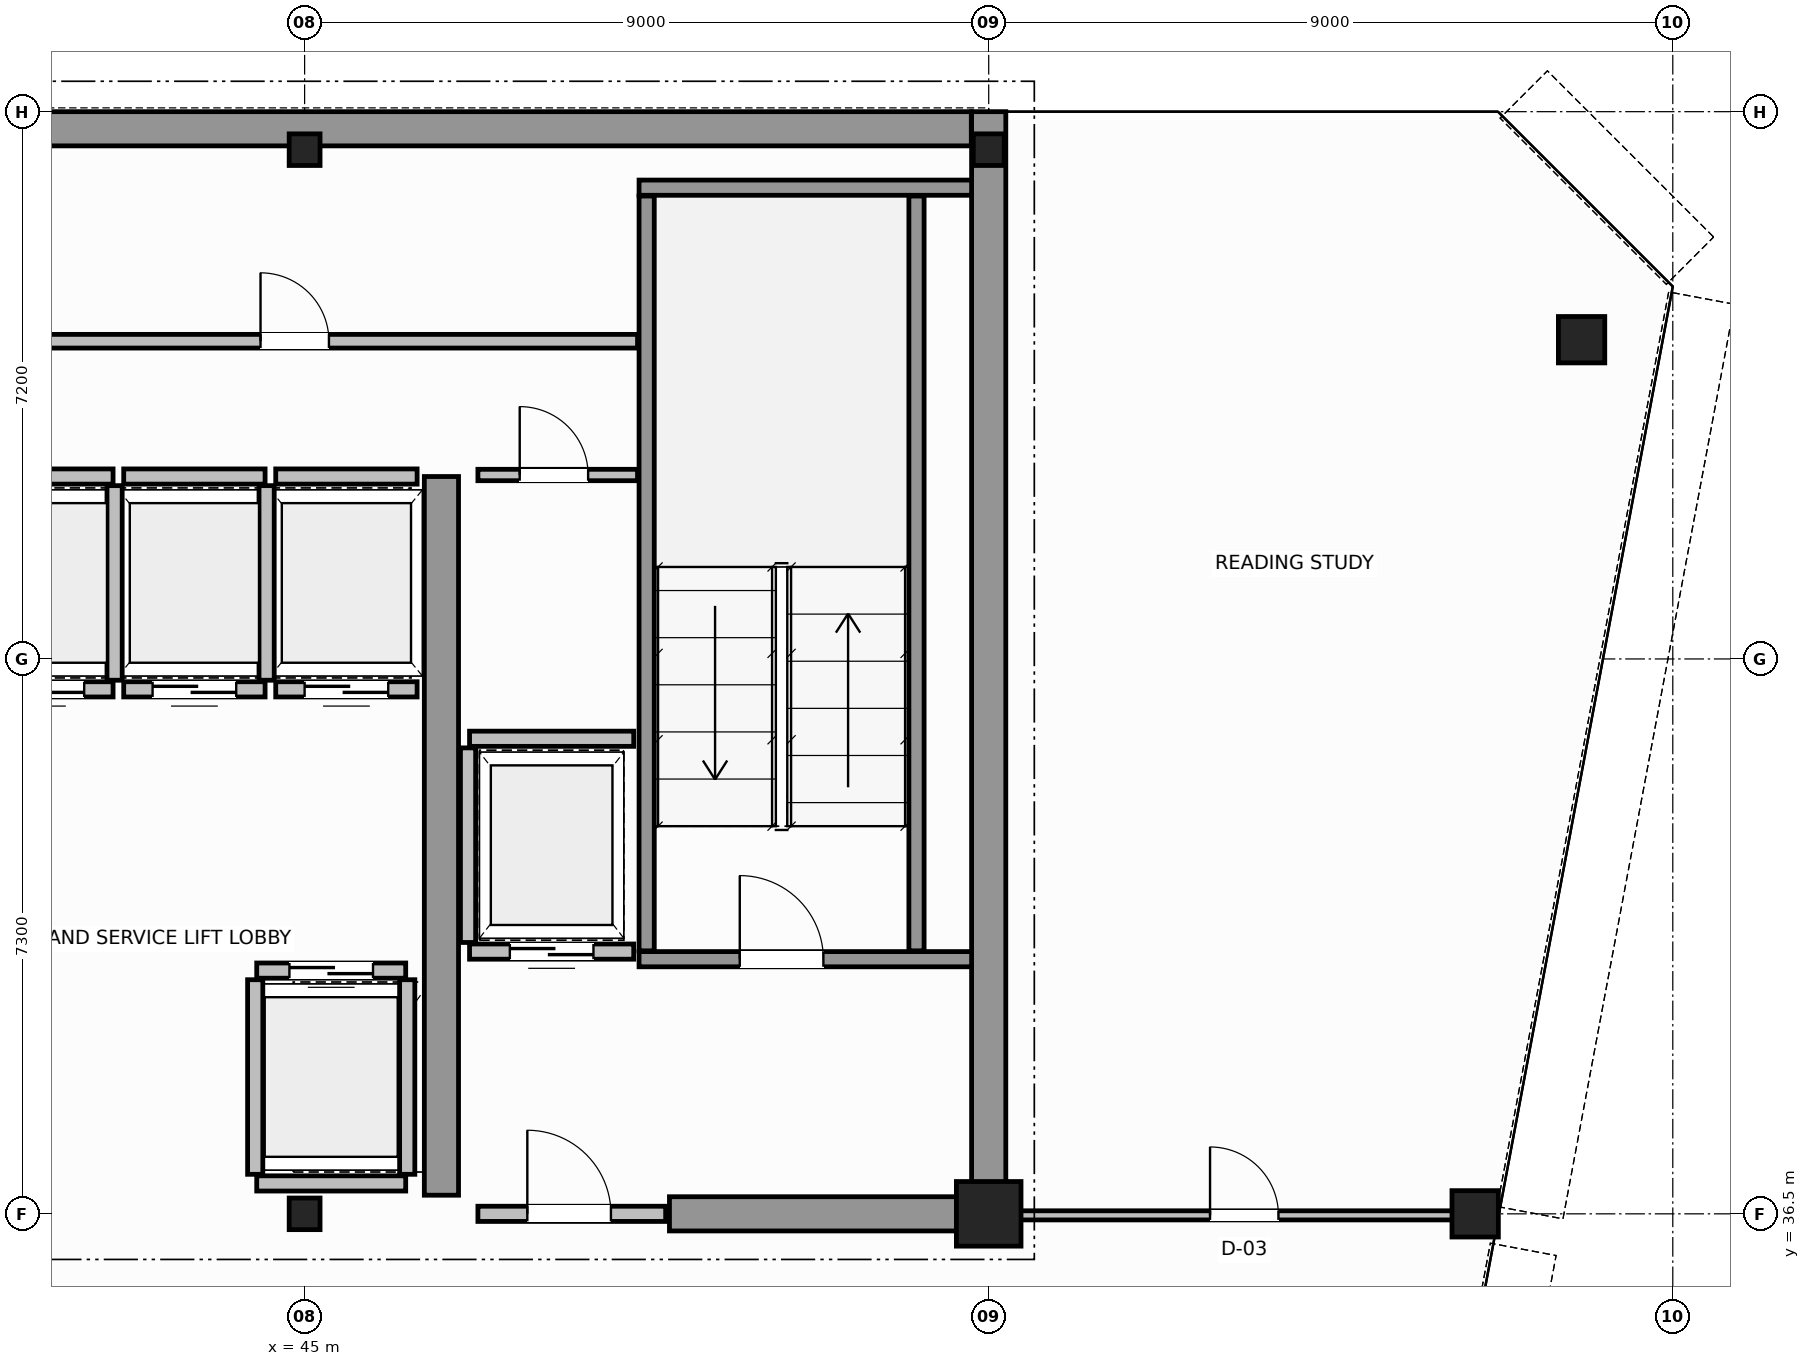
"""IFC4 building model, lengths in metres.
Left out: names, types, materials, properties, quantities, classifications, styles, units other than length and angle.
Written with IfcOpenShell. Run it as: python <this file> out.ifc"""

import sys

from ifc_helpers import new_model, si_unit, direction, frame, frame_2d, origin, origin_2d, place, context, subcontext, project, spatial, rectangle, hollow_circle, i_section, extrude, source, transform, mapped, element, fill, save


model = new_model("IFC4")
c1 = context("Model", 3, precision=1e-05, world=origin(), true_north=direction((0.0, 1.0)))
c2 = subcontext(c1, "Body", "Model", "MODEL_VIEW")
j1 = project(units=[si_unit("LENGTHUNIT", "METRE"), si_unit("PLANEANGLEUNIT", "RADIAN")], contexts=[c1])
p1 = place(None, origin())
s1 = spatial("IfcSite", under=j1, at=p1, CompositionType="ELEMENT")
p2 = place(p1, origin())
s2 = spatial("IfcBuilding", under=s1, at=p2, CompositionType="ELEMENT")
p3 = place(p2, frame((0.0, 0.0, 272.6)))
s3 = spatial("IfcBuildingStorey", under=s2, at=p3, CompositionType="ELEMENT", Elevation=272.6)
m1 = source(origin(), c2, "Body", "SweptSolid", [
    extrude(i_section(OverallWidth=0.406, OverallDepth=0.416, WebThickness=0.03, FlangeThickness=0.042, FilletRadius=0.015, at=origin_2d()), origin(), (0.0, 0.0, 1.0), 3.8),
])
p4 = place(p3, frame((45.0, 36.5, 0.0), z_axis=(0.0, 0.0, 1.0), x_axis=(1.0, 0.0, 0.0)))
e1 = element("IfcColumn", 1, at=p4, inside=s3, PredefinedType="COLUMN", context=c2, shape_type="MappedRepresentation", body=[
    mapped(m1, transform((0.0, 0.0, 0.0), scale=1.0)),
])
m2 = source(origin(), c2, "Body", "SweptSolid", [
    extrude(rectangle(XDim=0.85, YDim=0.85, at=origin_2d()), origin(), (0.0, 0.0, 1.0), 3.8),
])
p5 = place(p3, frame((54.0, 36.5, 0.0), z_axis=(0.0, 0.0, 1.0), x_axis=(1.0, 0.0, 0.0)))
e2 = element("IfcColumn", 2, at=p5, inside=s3, PredefinedType="COLUMN", context=c2, shape_type="MappedRepresentation", body=[
    mapped(m2, transform((0.0, 0.0, 0.0), scale=1.0)),
])
for number, where, z_axis, x_axis in (
    (3, (45.0, 50.5, 0.0), (0.0, 0.0, 1.0), (1.0, 0.0, 0.0)),
    (4, (54.0, 50.5, 0.0), (0.0, 0.0, 1.0), (1.0, 0.0, 0.0)),
):
    element("IfcColumn", number, at=place(p3, frame(where, z_axis=z_axis, x_axis=x_axis)), inside=s3, PredefinedType="COLUMN", context=c2, shape_type="MappedRepresentation", body=[
        mapped(m1, transform((0.0, 0.0, 0.0), scale=1.0)),
    ])
m3 = source(origin(), c2, "Body", "SweptSolid", [
    extrude(hollow_circle(Radius=0.305, WallThickness=0.03, at=origin_2d()), origin(), (0.0, 0.0, 1.0), 3.8),
])
for number, where, z_axis, x_axis in (
    (5, (61.8, 48.0, 0.0), (0.0, 0.0, 1.0), (1.0, 0.0, 0.0)),
    (6, (60.4, 36.5, 0.0), (0.0, 0.0, 1.0), (1.0, 0.0, 0.0)),
):
    element("IfcColumn", number, at=place(p3, frame(where, z_axis=z_axis, x_axis=x_axis)), inside=s3, PredefinedType="COLUMN", context=c2, shape_type="MappedRepresentation", body=[
        mapped(m3, transform((0.0, 0.0, 0.0), scale=1.0)),
    ])
p6 = place(p3, frame((34.002, 50.775, 0.0), z_axis=(0.0, 0.0, 1.0), x_axis=(1.0, 0.0, 0.0)))
e7 = element("IfcWall", 7, at=p6, inside=s3, PredefinedType="SHEAR", context=c2, shape_type="SweptSolid", body=[
    extrude(rectangle(XDim=19.769, YDim=0.45, at=frame_2d((9.885, 0.0))), origin(), (0.0, 0.0, 1.0), 3.8),
])
p7 = place(p3, frame((54.0, 36.5, 0.0), z_axis=(0.0, 0.0, 1.0), x_axis=(0.0, 1.0, 0.0)))
e8 = element("IfcWall", 8, at=p7, inside=s3, PredefinedType="SHEAR", context=c2, shape_type="SweptSolid", body=[
    extrude(rectangle(XDim=14.5, YDim=0.45, at=frame_2d((7.25, 0.0))), origin(), (0.0, 0.0, 1.0), 3.8),
])
p8 = place(p3, frame((49.8, 36.5, 0.0), z_axis=(0.0, 0.0, 1.0), x_axis=(1.0, 0.0, 0.0)))
e9 = element("IfcWall", 9, at=p8, inside=s3, PredefinedType="SHEAR", context=c2, shape_type="SweptSolid", body=[
    extrude(rectangle(XDim=3.955, YDim=0.45, at=frame_2d((1.978, 0.0))), origin(), (0.0, 0.0, 1.0), 2.58),
])
p9 = place(p3, frame((46.8, 36.745, 0.0), z_axis=(0.0, 0.0, 1.0), x_axis=(0.0, 1.0, 0.0)))
e10 = element("IfcWall", 10, at=p9, inside=s3, PredefinedType="SHEAR", context=c2, shape_type="SweptSolid", body=[
    extrude(rectangle(XDim=9.455, YDim=0.45, at=frame_2d((4.728, 0.0))), origin(), (0.0, 0.0, 1.0), 3.8),
])
p10 = place(p3, frame((49.4, 39.85, 0.0), z_axis=(0.0, 0.0, 1.0), x_axis=(1.0, 0.0, 0.0)))
e11 = element("IfcWall", 11, at=p10, inside=s3, PredefinedType="SOLIDWALL", context=c2, shape_type="SweptSolid", body=[
    extrude(rectangle(XDim=4.375, YDim=0.2, at=frame_2d((2.188, 0.0))), origin(), (0.0, 0.0, 1.0), 3.8),
])
p11 = place(p10, frame((1.325, 0.0, 0.0)))
e12 = element("IfcOpeningElement", 12, at=p11, cuts=e11, PredefinedType="OPENING", context=c2, shape_type="SweptSolid", body=[
    extrude(rectangle(XDim=1.1, YDim=2.15, at=frame_2d((0.55, 1.075))), frame((0.0, 0.11, 0.0), z_axis=(0.0, -1.0, 0.0), x_axis=(1.0, 0.0, 0.0)), (0.0, 0.0, 1.0), 0.22),
])
p12 = place(p3, frame((49.4, 50.0, 0.0), z_axis=(0.0, 0.0, 1.0), x_axis=(1.0, 0.0, 0.0)))
e13 = element("IfcWall", 13, at=p12, inside=s3, PredefinedType="SOLIDWALL", context=c2, shape_type="SweptSolid", body=[
    extrude(rectangle(XDim=4.375, YDim=0.2, at=frame_2d((2.188, 0.0))), origin(), (0.0, 0.0, 1.0), 3.8),
])
for number, where, z_axis, x_axis in (
    (14, (49.5, 39.96, 0.0), (0.0, 0.0, 1.0), (0.0, 1.0, 0.0)),
    (15, (53.05, 39.96, 0.0), (0.0, 0.0, 1.0), (0.0, 1.0, 0.0)),
):
    element("IfcWall", number, at=place(p3, frame(where, z_axis=z_axis, x_axis=x_axis)), inside=s3, PredefinedType="SOLIDWALL", context=c2, shape_type="SweptSolid", body=[
        extrude(rectangle(XDim=9.93, YDim=0.2, at=frame_2d((4.965, 0.0))), origin(), (0.0, 0.0, 1.0), 3.8),
    ])
p13 = place(p3, frame((47.28, 36.5, 0.0), z_axis=(0.0, 0.0, 1.0), x_axis=(1.0, 0.0, 0.0)))
e16 = element("IfcWall", 16, at=p13, inside=s3, PredefinedType="SOLIDWALL", context=c2, shape_type="SweptSolid", body=[
    extrude(rectangle(XDim=2.47, YDim=0.2, at=frame_2d((1.235, 0.0))), origin(), (0.0, 0.0, 1.0), 2.57),
])
p14 = place(p13, frame((0.65, 0.0, 0.0)))
e17 = element("IfcOpeningElement", 17, at=p14, cuts=e16, PredefinedType="OPENING", context=c2, shape_type="SweptSolid", body=[
    extrude(rectangle(XDim=1.1, YDim=2.15, at=frame_2d((0.55, 1.075))), frame((0.0, 0.11, 0.0), z_axis=(0.0, -1.0, 0.0), x_axis=(1.0, 0.0, 0.0)), (0.0, 0.0, 1.0), 0.22),
])
p15 = place(p3, frame((44.37, 39.7, 0.0), z_axis=(0.0, 0.0, 1.0), x_axis=(1.0, 0.0, 0.0)))
e18 = element("IfcWall", 18, at=p15, inside=s3, PredefinedType="SOLIDWALL", context=c2, shape_type="SweptSolid", body=[
    extrude(rectangle(XDim=1.96, YDim=0.2, at=frame_2d((0.98, 0.0))), origin(), (0.0, 0.0, 1.0), 3.58),
])
p16 = place(p15, frame((0.43, 0.0, 0.0)))
e19 = element("IfcOpeningElement", 19, at=p16, cuts=e18, PredefinedType="OPENING", context=c2, shape_type="SweptSolid", body=[
    extrude(rectangle(XDim=1.1, YDim=2.15, at=frame_2d((0.55, 1.075))), frame((0.0, 0.11, 0.0), z_axis=(0.0, -1.0, 0.0), x_axis=(1.0, 0.0, 0.0)), (0.0, 0.0, 1.0), 0.22),
])
p17 = place(p3, frame((44.37, 36.9, 0.0), z_axis=(0.0, 0.0, 1.0), x_axis=(1.0, 0.0, 0.0)))
e20 = element("IfcWall", 20, at=p17, inside=s3, PredefinedType="SOLIDWALL", context=c2, shape_type="SweptSolid", body=[
    extrude(rectangle(XDim=1.96, YDim=0.2, at=frame_2d((0.98, 0.0))), origin(), (0.0, 0.0, 1.0), 2.57),
])
for number, where, z_axis, x_axis in (
    (21, (44.35, 37.02, 0.0), (0.0, 0.0, 1.0), (0.0, 1.0, 0.0)),
    (22, (46.35, 37.02, 0.0), (0.0, 0.0, 1.0), (0.0, 1.0, 0.0)),
):
    element("IfcWall", number, at=place(p3, frame(where, z_axis=z_axis, x_axis=x_axis)), inside=s3, PredefinedType="SOLIDWALL", context=c2, shape_type="SweptSolid", body=[
        extrude(rectangle(XDim=2.56, YDim=0.2, at=frame_2d((1.28, 0.0))), origin(), (0.0, 0.0, 1.0), 3.58),
    ])
p18 = place(p3, frame((40.62, 43.4, 0.0), z_axis=(0.0, 0.0, 1.0), x_axis=(1.0, 0.0, 0.0)))
e23 = element("IfcWall", 23, at=p18, inside=s3, PredefinedType="SOLIDWALL", context=c2, shape_type="SweptSolid", body=[
    extrude(rectangle(XDim=1.86, YDim=0.2, at=frame_2d((0.93, 0.0))), origin(), (0.0, 0.0, 1.0), 3.58),
])
p19 = place(p18, frame((0.38, 0.0, 0.0)))
e24 = element("IfcOpeningElement", 24, at=p19, cuts=e23, PredefinedType="OPENING", context=c2, shape_type="SweptSolid", body=[
    extrude(rectangle(XDim=1.1, YDim=2.15, at=frame_2d((0.55, 1.075))), frame((0.0, 0.11, 0.0), z_axis=(0.0, -1.0, 0.0), x_axis=(1.0, 0.0, 0.0)), (0.0, 0.0, 1.0), 0.22),
])
p20 = place(p3, frame((40.62, 46.2, 0.0), z_axis=(0.0, 0.0, 1.0), x_axis=(1.0, 0.0, 0.0)))
e25 = element("IfcWall", 25, at=p20, inside=s3, PredefinedType="SOLIDWALL", context=c2, shape_type="SweptSolid", body=[
    extrude(rectangle(XDim=1.86, YDim=0.2, at=frame_2d((0.93, 0.0))), origin(), (0.0, 0.0, 1.0), 3.58),
])
p21 = place(p3, frame((42.5, 43.52, 0.0), z_axis=(0.0, 0.0, 1.0), x_axis=(0.0, 1.0, 0.0)))
e26 = element("IfcWall", 26, at=p21, inside=s3, PredefinedType="SOLIDWALL", context=c2, shape_type="SweptSolid", body=[
    extrude(rectangle(XDim=2.56, YDim=0.2, at=frame_2d((1.28, 0.0))), origin(), (0.0, 0.0, 1.0), 3.58),
])
p22 = place(p3, frame((42.62, 43.4, 0.0), z_axis=(0.0, 0.0, 1.0), x_axis=(1.0, 0.0, 0.0)))
e27 = element("IfcWall", 27, at=p22, inside=s3, PredefinedType="SOLIDWALL", context=c2, shape_type="SweptSolid", body=[
    extrude(rectangle(XDim=1.86, YDim=0.2, at=frame_2d((0.93, 0.0))), origin(), (0.0, 0.0, 1.0), 3.58),
])
p23 = place(p22, frame((0.38, 0.0, 0.0)))
e28 = element("IfcOpeningElement", 28, at=p23, cuts=e27, PredefinedType="OPENING", context=c2, shape_type="SweptSolid", body=[
    extrude(rectangle(XDim=1.1, YDim=2.15, at=frame_2d((0.55, 1.075))), frame((0.0, 0.11, 0.0), z_axis=(0.0, -1.0, 0.0), x_axis=(1.0, 0.0, 0.0)), (0.0, 0.0, 1.0), 0.22),
])
p24 = place(p3, frame((42.62, 46.2, 0.0), z_axis=(0.0, 0.0, 1.0), x_axis=(1.0, 0.0, 0.0)))
e29 = element("IfcWall", 29, at=p24, inside=s3, PredefinedType="SOLIDWALL", context=c2, shape_type="SweptSolid", body=[
    extrude(rectangle(XDim=1.86, YDim=0.2, at=frame_2d((0.93, 0.0))), origin(), (0.0, 0.0, 1.0), 3.58),
])
p25 = place(p3, frame((44.5, 43.52, 0.0), z_axis=(0.0, 0.0, 1.0), x_axis=(0.0, 1.0, 0.0)))
e30 = element("IfcWall", 30, at=p25, inside=s3, PredefinedType="SOLIDWALL", context=c2, shape_type="SweptSolid", body=[
    extrude(rectangle(XDim=2.56, YDim=0.2, at=frame_2d((1.28, 0.0))), origin(), (0.0, 0.0, 1.0), 3.58),
])
p26 = place(p3, frame((44.62, 43.4, 0.0), z_axis=(0.0, 0.0, 1.0), x_axis=(1.0, 0.0, 0.0)))
e31 = element("IfcWall", 31, at=p26, inside=s3, PredefinedType="SOLIDWALL", context=c2, shape_type="SweptSolid", body=[
    extrude(rectangle(XDim=1.86, YDim=0.2, at=frame_2d((0.93, 0.0))), origin(), (0.0, 0.0, 1.0), 3.58),
])
p27 = place(p26, frame((0.38, 0.0, 0.0)))
e32 = element("IfcOpeningElement", 32, at=p27, cuts=e31, PredefinedType="OPENING", context=c2, shape_type="SweptSolid", body=[
    extrude(rectangle(XDim=1.1, YDim=2.15, at=frame_2d((0.55, 1.075))), frame((0.0, 0.11, 0.0), z_axis=(0.0, -1.0, 0.0), x_axis=(1.0, 0.0, 0.0)), (0.0, 0.0, 1.0), 0.22),
])
p28 = place(p3, frame((44.62, 46.2, 0.0), z_axis=(0.0, 0.0, 1.0), x_axis=(1.0, 0.0, 0.0)))
e33 = element("IfcWall", 33, at=p28, inside=s3, PredefinedType="SOLIDWALL", context=c2, shape_type="SweptSolid", body=[
    extrude(rectangle(XDim=1.86, YDim=0.2, at=frame_2d((0.93, 0.0))), origin(), (0.0, 0.0, 1.0), 3.58),
])
p29 = place(p3, frame((47.17, 39.95, 0.0), z_axis=(0.0, 0.0, 1.0), x_axis=(1.0, 0.0, 0.0)))
e34 = element("IfcWall", 34, at=p29, inside=s3, PredefinedType="SOLIDWALL", context=c2, shape_type="SweptSolid", body=[
    extrude(rectangle(XDim=2.16, YDim=0.2, at=frame_2d((1.08, 0.0))), origin(), (0.0, 0.0, 1.0), 3.58),
])
p30 = place(p29, frame((0.53, 0.0, 0.0)))
e35 = element("IfcOpeningElement", 35, at=p30, cuts=e34, PredefinedType="OPENING", context=c2, shape_type="SweptSolid", body=[
    extrude(rectangle(XDim=1.1, YDim=2.15, at=frame_2d((0.55, 1.075))), frame((0.0, 0.11, 0.0), z_axis=(0.0, -1.0, 0.0), x_axis=(1.0, 0.0, 0.0)), (0.0, 0.0, 1.0), 0.22),
])
p31 = place(p3, frame((47.17, 42.75, 0.0), z_axis=(0.0, 0.0, 1.0), x_axis=(1.0, 0.0, 0.0)))
e36 = element("IfcWall", 36, at=p31, inside=s3, PredefinedType="SOLIDWALL", context=c2, shape_type="SweptSolid", body=[
    extrude(rectangle(XDim=2.16, YDim=0.2, at=frame_2d((1.08, 0.0))), origin(), (0.0, 0.0, 1.0), 3.58),
])
p32 = place(p3, frame((47.15, 40.07, 0.0), z_axis=(0.0, 0.0, 1.0), x_axis=(0.0, 1.0, 0.0)))
e37 = element("IfcWall", 37, at=p32, inside=s3, PredefinedType="SOLIDWALL", context=c2, shape_type="SweptSolid", body=[
    extrude(rectangle(XDim=2.56, YDim=0.2, at=frame_2d((1.28, 0.0))), origin(), (0.0, 0.0, 1.0), 3.58),
])
p33 = place(p3, frame((47.28, 46.22, 0.0), z_axis=(0.0, 0.0, 1.0), x_axis=(1.0, 0.0, 0.0)))
e38 = element("IfcWall", 38, at=p33, inside=s3, PredefinedType="PARTITIONING", context=c2, shape_type="SweptSolid", body=[
    extrude(rectangle(XDim=2.1, YDim=0.15, at=frame_2d((1.05, 0.0))), origin(), (0.0, 0.0, 1.0), 3.58),
])
p34 = place(p33, frame((0.55, 0.0, 0.0)))
e39 = element("IfcOpeningElement", 39, at=p34, cuts=e38, PredefinedType="OPENING", context=c2, shape_type="SweptSolid", body=[
    extrude(rectangle(XDim=0.9, YDim=2.1, at=frame_2d((0.45, 1.05))), frame((0.0, 0.085, 0.0), z_axis=(0.0, -1.0, 0.0), x_axis=(1.0, 0.0, 0.0)), (0.0, 0.0, 1.0), 0.17),
])
p35 = place(p3, frame((40.62, 47.98, 0.0), z_axis=(0.0, 0.0, 1.0), x_axis=(1.0, 0.0, 0.0)))
e40 = element("IfcWall", 40, at=p35, inside=s3, PredefinedType="PLUMBINGWALL", context=c2, shape_type="SweptSolid", body=[
    extrude(rectangle(XDim=8.76, YDim=0.18, at=frame_2d((4.38, 0.0))), origin(), (0.0, 0.0, 1.0), 3.58),
])
p36 = place(p35, frame((3.8, 0.0, 0.0)))
e41 = element("IfcOpeningElement", 41, at=p36, cuts=e40, PredefinedType="OPENING", context=c2, shape_type="SweptSolid", body=[
    extrude(rectangle(XDim=0.9, YDim=2.15, at=frame_2d((0.45, 1.075))), frame((0.0, 0.1, 0.0), z_axis=(0.0, -1.0, 0.0), x_axis=(1.0, 0.0, 0.0)), (0.0, 0.0, 1.0), 0.2),
])
p37 = place(p3, frame((54.06, 36.48, 0.0), z_axis=(0.0, 0.0, 1.0), x_axis=(1.0, 0.0, 0.0)))
e42 = element("IfcWall", 42, at=p37, inside=s3, PredefinedType="PARTITIONING", context=c2, shape_type="SweptSolid", body=[
    extrude(rectangle(XDim=6.604, YDim=0.12, at=frame_2d((3.302, 0.0))), origin(), (0.0, 0.0, 1.0), 3.02),
])
p38 = place(p37, frame((2.852, 0.0, 0.0)))
e43 = element("IfcOpeningElement", 43, at=p38, cuts=e42, PredefinedType="OPENING", context=c2, shape_type="SweptSolid", body=[
    extrude(rectangle(XDim=0.9, YDim=2.15, at=frame_2d((0.45, 1.075))), frame((0.0, 0.07, 0.0), z_axis=(0.0, -1.0, 0.0), x_axis=(1.0, 0.0, 0.0)), (0.0, 0.0, 1.0), 0.14),
])
m4 = source(origin(), c2, "Body", "SweptSolid", [
    extrude(rectangle(XDim=1.1, YDim=2.15, at=frame_2d((0.55, 1.075))), frame((0.0, 0.025, 0.0), z_axis=(0.0, -1.0, 0.0), x_axis=(1.0, 0.0, 0.0)), (0.0, 0.0, 1.0), 0.05),
])
p39 = place(p11, origin())
e44 = element("IfcDoor", 44, at=p39, inside=s3, OperationType="SINGLE_SWING_RIGHT", PredefinedType="DOOR", context=c2, shape_type="MappedRepresentation", body=[
    mapped(m4, transform((0.0, 0.0, 0.0), scale=1.0)),
])
fill(e12, e44)
p40 = place(p14, origin())
e45 = element("IfcDoor", 45, at=p40, inside=s3, OperationType="SINGLE_SWING_LEFT", PredefinedType="DOOR", context=c2, shape_type="MappedRepresentation", body=[
    mapped(m4, transform((0.0, 0.0, 0.0), scale=1.0)),
])
fill(e17, e45)
p41 = place(p16, origin())
e46 = element("IfcDoor", 46, at=p41, inside=s3, OperationType="DOUBLE_DOOR_SLIDING", PredefinedType="DOOR", context=c2, shape_type="MappedRepresentation", body=[
    mapped(m4, transform((0.0, 0.0, 0.0), scale=1.0)),
])
fill(e19, e46)
p42 = place(p19, origin())
e47 = element("IfcDoor", 47, at=p42, inside=s3, OperationType="DOUBLE_DOOR_SLIDING", PredefinedType="DOOR", context=c2, shape_type="MappedRepresentation", body=[
    mapped(m4, transform((0.0, 0.0, 0.0), scale=1.0)),
])
fill(e24, e47)
p43 = place(p23, origin())
e48 = element("IfcDoor", 48, at=p43, inside=s3, OperationType="DOUBLE_DOOR_SLIDING", PredefinedType="DOOR", context=c2, shape_type="MappedRepresentation", body=[
    mapped(m4, transform((0.0, 0.0, 0.0), scale=1.0)),
])
fill(e28, e48)
p44 = place(p27, origin())
e49 = element("IfcDoor", 49, at=p44, inside=s3, OperationType="DOUBLE_DOOR_SLIDING", PredefinedType="DOOR", context=c2, shape_type="MappedRepresentation", body=[
    mapped(m4, transform((0.0, 0.0, 0.0), scale=1.0)),
])
fill(e32, e49)
p45 = place(p30, origin())
e50 = element("IfcDoor", 50, at=p45, inside=s3, OperationType="DOUBLE_DOOR_SLIDING", PredefinedType="DOOR", context=c2, shape_type="MappedRepresentation", body=[
    mapped(m4, transform((0.0, 0.0, 0.0), scale=1.0)),
])
fill(e35, e50)
m5 = source(origin(), c2, "Body", "SweptSolid", [
    extrude(rectangle(XDim=0.9, YDim=2.1, at=frame_2d((0.45, 1.05))), frame((0.0, 0.025, 0.0), z_axis=(0.0, -1.0, 0.0), x_axis=(1.0, 0.0, 0.0)), (0.0, 0.0, 1.0), 0.05),
])
p46 = place(p34, origin())
e51 = element("IfcDoor", 51, at=p46, inside=s3, OperationType="SINGLE_SWING_RIGHT", PredefinedType="DOOR", context=c2, shape_type="MappedRepresentation", body=[
    mapped(m5, transform((0.0, 0.0, 0.0), scale=1.0)),
])
fill(e39, e51)
m6 = source(origin(), c2, "Body", "SweptSolid", [
    extrude(rectangle(XDim=0.9, YDim=2.15, at=frame_2d((0.45, 1.075))), frame((0.0, 0.025, 0.0), z_axis=(0.0, -1.0, 0.0), x_axis=(1.0, 0.0, 0.0)), (0.0, 0.0, 1.0), 0.05),
])
p47 = place(p36, origin())
e52 = element("IfcDoor", 52, at=p47, inside=s3, OperationType="SINGLE_SWING_RIGHT", PredefinedType="DOOR", context=c2, shape_type="MappedRepresentation", body=[
    mapped(m6, transform((0.0, 0.0, 0.0), scale=1.0)),
])
fill(e41, e52)
p48 = place(p38, origin())
e53 = element("IfcDoor", 53, at=p48, inside=s3, OperationType="SINGLE_SWING_RIGHT", PredefinedType="DOOR", context=c2, shape_type="MappedRepresentation", body=[
    mapped(m6, transform((0.0, 0.0, 0.0), scale=1.0)),
])
fill(e43, e53)
save(model, sys.argv[1])
